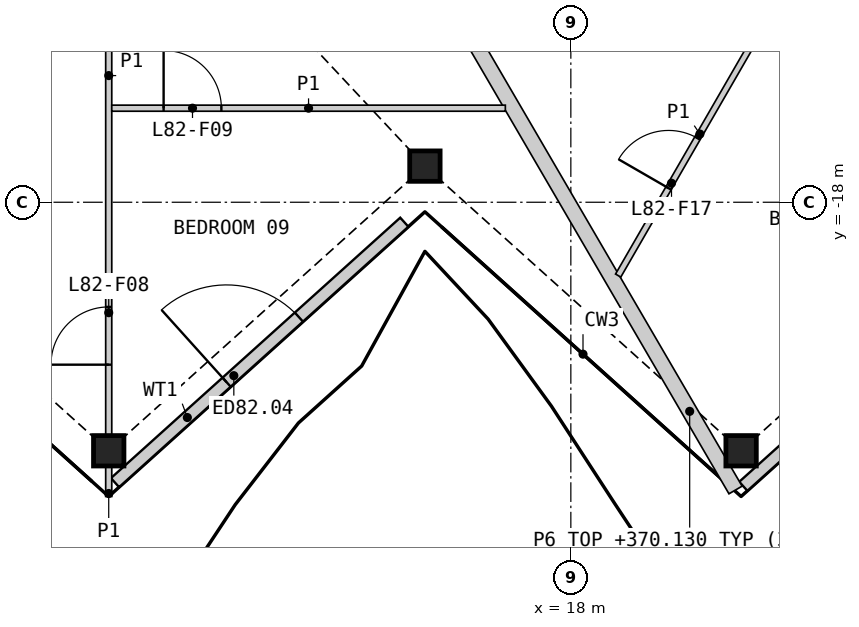
"""IFC4 building model, lengths in metres.
Left out: names, types, materials, properties, quantities, classifications, styles, units other than length and angle.
Written with IfcOpenShell. Run it as: python <this file> out.ifc"""

import sys

from ifc_helpers import new_model, si_unit, direction, frame, frame_2d, origin, origin_2d, place, context, subcontext, project, spatial, rectangle, hollow_rectangle, extrude, element, fill, save


model = new_model("IFC4")
c1 = context("Model", 3, precision=1e-05, world=origin(), true_north=direction((0.0, 1.0)))
c2 = subcontext(c1, "Body", "Model", "MODEL_VIEW")
j1 = project(units=[si_unit("LENGTHUNIT", "METRE"), si_unit("PLANEANGLEUNIT", "RADIAN")], contexts=[c1])
p1 = place(None, origin())
s1 = spatial("IfcSite", under=j1, at=p1, CompositionType="ELEMENT")
p2 = place(p1, origin())
s2 = spatial("IfcBuilding", under=s1, at=p2, CompositionType="ELEMENT")
p3 = place(p2, frame((0.0, 0.0, 367.8)))
s3 = spatial("IfcBuildingStorey", under=s2, at=p3, CompositionType="ELEMENT", Elevation=367.8)
for number, where, z_axis, x_axis in (
    (1, (10.4, -22.088, 0.0), (0.0, 0.0, 1.0), (1.0, 0.0, 0.0)),
    (2, (15.6, -17.406, 0.0), (0.0, 0.0, 1.0), (1.0, 0.0, 0.0)),
    (3, (20.8, -22.088, 0.0), (0.0, 0.0, 1.0), (1.0, 0.0, 0.0)),
):
    element("IfcColumn", number, at=place(p3, frame(where, z_axis=z_axis, x_axis=x_axis)), inside=s3, PredefinedType="COLUMN", context=c2, shape_type="SweptSolid", body=[
        extrude(hollow_rectangle(XDim=0.5, YDim=0.5, WallThickness=0.03, at=origin_2d()), origin(), (0.0, 0.0, 1.0), 3.4),
    ])
p4 = place(p3, frame((10.503, -22.612, 0.0), z_axis=(0.0, 0.0, 1.0), x_axis=(0.743148117717, 0.669126949939, 0.0)))
e4 = element("IfcWall", 4, at=p4, inside=s3, PredefinedType="SOLIDWALL", context=c2, shape_type="SweptSolid", body=[
    extrude(rectangle(XDim=6.402, YDim=0.2, at=frame_2d((3.201, 0.0))), origin(), (0.0, 0.0, 1.0), 2.634),
])
p5 = place(p4, frame((2.469, 0.0, 0.0)))
e5 = element("IfcOpeningElement", 5, at=p5, cuts=e4, PredefinedType="OPENING", context=c2, shape_type="SweptSolid", body=[
    extrude(rectangle(XDim=1.6, YDim=2.25, at=frame_2d((0.8, 1.125))), frame((0.0, 0.11, 0.0), z_axis=(0.0, -1.0, 0.0), x_axis=(1.0, 0.0, 0.0)), (0.0, 0.0, 1.0), 0.22),
])
p6 = place(p3, frame((20.837, -22.672, 0.0), z_axis=(0.0, 0.0, 1.0), x_axis=(0.743143698099, 0.669131858437, 0.0)))
e6 = element("IfcWall", 6, at=p6, inside=s3, PredefinedType="SOLIDWALL", context=c2, shape_type="SweptSolid", body=[
    extrude(rectangle(XDim=6.779, YDim=0.2, at=frame_2d((3.389, 0.0))), origin(), (0.0, 0.0, 1.0), 2.634),
])
p7 = place(p6, frame((2.559, 0.0, 0.0)))
e7 = element("IfcOpeningElement", 7, at=p7, cuts=e6, PredefinedType="OPENING", context=c2, shape_type="SweptSolid", body=[
    extrude(rectangle(XDim=1.6, YDim=2.25, at=frame_2d((0.8, 1.125))), frame((0.0, 0.11, 0.0), z_axis=(0.0, -1.0, 0.0), x_axis=(1.0, 0.0, 0.0)), (0.0, 0.0, 1.0), 0.22),
])
p8 = place(p3, frame((13.168, -9.798, 0.0), z_axis=(0.0, 0.0, 1.0), x_axis=(0.503632750219, -0.863917850786, 0.0)))
e8 = element("IfcWall", 8, at=p8, inside=s3, PredefinedType="PARTITIONING", context=c2, shape_type="SweptSolid", body=[
    extrude(rectangle(XDim=14.972, YDim=0.25, at=frame_2d((7.486, 0.0))), origin(), (0.0, 0.0, 1.0), 2.33),
])
p9 = place(p3, frame((16.216, -10.234, 0.0), z_axis=(0.0, 0.0, 1.0), x_axis=(0.777145059662, -0.629321504672, 0.0)))
e9 = element("IfcWall", 9, at=p9, inside=s3, PredefinedType="PARTITIONING", context=c2, shape_type="SweptSolid", body=[
    extrude(rectangle(XDim=12.59, YDim=0.1, at=frame_2d((6.295, 0.0))), origin(), (0.0, 0.0, 1.0), 2.33),
])
p10 = place(p9, frame((7.074, 0.0, 0.0)))
e10 = element("IfcOpeningElement", 10, at=p10, cuts=e9, PredefinedType="OPENING", context=c2, shape_type="SweptSolid", body=[
    extrude(rectangle(XDim=0.95, YDim=2.1, at=frame_2d((0.475, 1.05))), frame((0.0, 0.06, 0.0), z_axis=(0.0, -1.0, 0.0), x_axis=(1.0, 0.0, 0.0)), (0.0, 0.0, 1.0), 0.12),
])
p11 = place(p3, frame((10.4, -21.828, 0.0), z_axis=(0.0, 0.0, 1.0), x_axis=(0.0, 1.0, 0.0)))
e11 = element("IfcWall", 11, at=p11, inside=s3, PredefinedType="PARTITIONING", context=c2, shape_type="SweptSolid", body=[
    extrude(rectangle(XDim=11.822, YDim=0.1, at=frame_2d((5.911, 0.0))), origin(), (0.0, 0.0, 1.0), 2.33),
])
p12 = place(p11, frame((1.156, 0.0, 0.0)))
e12 = element("IfcOpeningElement", 12, at=p12, cuts=e11, PredefinedType="OPENING", context=c2, shape_type="SweptSolid", body=[
    extrude(rectangle(XDim=0.95, YDim=2.1, at=frame_2d((0.475, 1.05))), frame((0.0, 0.06, 0.0), z_axis=(0.0, -1.0, 0.0), x_axis=(1.0, 0.0, 0.0)), (0.0, 0.0, 1.0), 0.12),
])
p13 = place(p3, frame((10.45, -16.453, 0.0), z_axis=(0.0, 0.0, 1.0), x_axis=(1.0, 0.0, 0.0)))
e13 = element("IfcWall", 13, at=p13, inside=s3, PredefinedType="PARTITIONING", context=c2, shape_type="SweptSolid", body=[
    extrude(rectangle(XDim=6.473, YDim=0.1, at=frame_2d((3.236, 0.0))), origin(), (0.0, 0.0, 1.0), 2.33),
])
p14 = place(p13, frame((0.853, 0.0, 0.0)))
e14 = element("IfcOpeningElement", 14, at=p14, cuts=e13, PredefinedType="OPENING", context=c2, shape_type="SweptSolid", body=[
    extrude(rectangle(XDim=0.95, YDim=2.1, at=frame_2d((0.475, 1.05))), frame((0.0, 0.06, 0.0), z_axis=(0.0, -1.0, 0.0), x_axis=(1.0, 0.0, 0.0)), (0.0, 0.0, 1.0), 0.12),
])
p15 = place(p3, frame((18.778, -19.206, 0.0), z_axis=(0.0, 0.0, 1.0), x_axis=(0.499992359988, 0.866029814703, 0.0)))
e15 = element("IfcWall", 15, at=p15, inside=s3, PredefinedType="PARTITIONING", context=c2, shape_type="SweptSolid", body=[
    extrude(rectangle(XDim=5.376, YDim=0.1, at=frame_2d((2.688, 0.0))), origin(), (0.0, 0.0, 1.0), 2.33),
])
p16 = place(p15, frame((1.659, 0.0, 0.0)))
e16 = element("IfcOpeningElement", 16, at=p16, cuts=e15, PredefinedType="OPENING", context=c2, shape_type="SweptSolid", body=[
    extrude(rectangle(XDim=0.95, YDim=2.1, at=frame_2d((0.475, 1.05))), frame((0.0, 0.06, 0.0), z_axis=(0.0, -1.0, 0.0), x_axis=(1.0, 0.0, 0.0)), (0.0, 0.0, 1.0), 0.12),
])
p17 = place(p3, frame((10.4, -22.839, 0.0), z_axis=(0.0, 0.0, 1.0), x_axis=(0.0, 1.0, 0.0)))
e17 = element("IfcWall", 17, at=p17, inside=s3, PredefinedType="PARTITIONING", context=c2, shape_type="SweptSolid", body=[
    extrude(rectangle(XDim=0.491, YDim=0.1, at=frame_2d((0.246, 0.0))), origin(), (0.0, 0.0, 1.0), 2.33),
])
p18 = place(p5, origin())
e18 = element("IfcDoor", 18, at=p18, inside=s3, OperationType="DOUBLE_DOOR_SINGLE_SWING", PredefinedType="DOOR", context=c2, shape_type="SweptSolid", body=[
    extrude(rectangle(XDim=1.6, YDim=2.25, at=frame_2d((0.8, 1.125))), frame((0.0, 0.025, 0.0), z_axis=(0.0, -1.0, 0.0), x_axis=(1.0, 0.0, 0.0)), (0.0, 0.0, 1.0), 0.05),
])
fill(e5, e18)
p19 = place(p12, origin())
e19 = element("IfcDoor", 19, at=p19, inside=s3, OperationType="SINGLE_SWING_LEFT", PredefinedType="DOOR", context=c2, shape_type="SweptSolid", body=[
    extrude(rectangle(XDim=0.95, YDim=2.1, at=frame_2d((0.475, 1.05))), frame((0.0, 0.025, 0.0), z_axis=(0.0, -1.0, 0.0), x_axis=(1.0, 0.0, 0.0)), (0.0, 0.0, 1.0), 0.05),
])
fill(e12, e19)
p20 = place(p14, origin())
e20 = element("IfcDoor", 20, at=p20, inside=s3, OperationType="SINGLE_SWING_LEFT", PredefinedType="DOOR", context=c2, shape_type="SweptSolid", body=[
    extrude(rectangle(XDim=0.95, YDim=2.1, at=frame_2d((0.475, 1.05))), frame((0.0, 0.025, 0.0), z_axis=(0.0, -1.0, 0.0), x_axis=(1.0, 0.0, 0.0)), (0.0, 0.0, 1.0), 0.05),
])
fill(e14, e20)
p21 = place(p16, origin())
e21 = element("IfcDoor", 21, at=p21, inside=s3, OperationType="SINGLE_SWING_LEFT", PredefinedType="DOOR", context=c2, shape_type="SweptSolid", body=[
    extrude(rectangle(XDim=0.95, YDim=2.1, at=frame_2d((0.475, 1.05))), frame((0.0, 0.025, 0.0), z_axis=(0.0, -1.0, 0.0), x_axis=(1.0, 0.0, 0.0)), (0.0, 0.0, 1.0), 0.05),
])
fill(e16, e21)
save(model, sys.argv[1])
